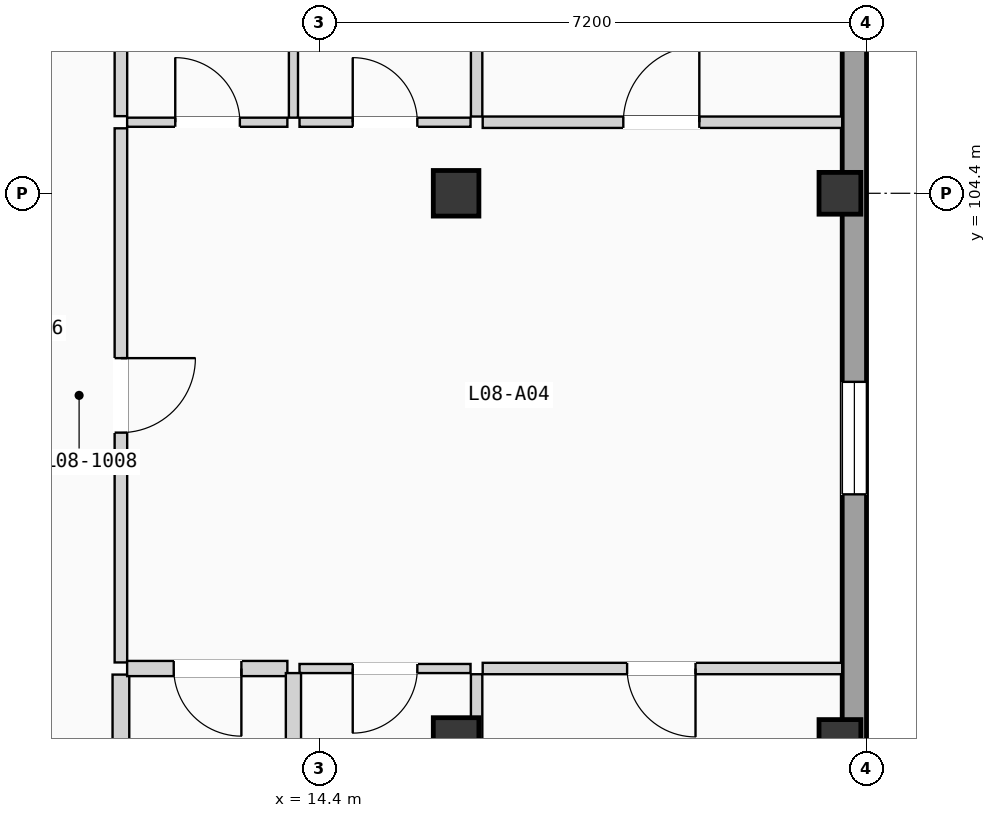
"""IFC4 building model, lengths in metres.
Left out: names, types, materials, properties, quantities, classifications, styles, units other than length and angle.
Written with IfcOpenShell. Run it as: python <this file> out.ifc"""

import sys

from ifc_helpers import new_model, si_unit, direction, frame, frame_2d, origin, origin_2d, place, context, subcontext, project, spatial, rectangle, extrude, element, fill, save


model = new_model("IFC4")
c1 = context("Model", 3, precision=1e-05, world=origin(), true_north=direction((0.0, 1.0)))
c2 = subcontext(c1, "Body", "Model", "MODEL_VIEW")
j1 = project(units=[si_unit("LENGTHUNIT", "METRE"), si_unit("PLANEANGLEUNIT", "RADIAN")], contexts=[c1])
p1 = place(None, origin())
s1 = spatial("IfcSite", under=j1, at=p1, CompositionType="ELEMENT")
p2 = place(p1, origin())
s2 = spatial("IfcBuilding", under=s1, at=p2, CompositionType="ELEMENT")
p3 = place(p2, frame((0.0, 0.0, 27.825)))
s3 = spatial("IfcBuildingStorey", under=s2, at=p3, CompositionType="ELEMENT", Elevation=27.825)
for number, where, z_axis, x_axis in (
    (1, (16.2, 97.2, 0.0), (0.0, 0.0, 1.0), (1.0, 0.0, 0.0)),
    (2, (16.2, 104.4, 0.0), (0.0, 0.0, 1.0), (1.0, 0.0, 0.0)),
):
    element("IfcColumn", number, at=place(p3, frame(where, z_axis=z_axis, x_axis=x_axis)), inside=s3, PredefinedType="COLUMN", context=c2, shape_type="SweptSolid", body=[
        extrude(rectangle(XDim=0.6, YDim=0.6, at=origin_2d()), origin(), (0.0, 0.0, 1.0), 3.15),
    ])
for number, where, z_axis, x_axis in (
    (3, (21.25, 97.2, 0.0), (0.0, 0.0, 1.0), (1.0, 0.0, 0.0)),
    (4, (21.25, 104.4, 0.0), (0.0, 0.0, 1.0), (1.0, 0.0, 0.0)),
):
    element("IfcColumn", number, at=place(p3, frame(where, z_axis=z_axis, x_axis=x_axis)), inside=s3, PredefinedType="COLUMN", context=c2, shape_type="SweptSolid", body=[
        extrude(rectangle(XDim=0.55, YDim=0.55, at=origin_2d()), origin(), (0.0, 0.0, 1.0), 3.15),
    ])
p4 = place(p3, frame((21.44, 68.72, 0.0), z_axis=(0.0, 0.0, 1.0), x_axis=(0.0, 1.0, 0.0)))
e5 = element("IfcWall", 5, at=p4, inside=s3, PredefinedType="SOLIDWALL", context=c2, shape_type="SweptSolid", body=[
    extrude(rectangle(XDim=49.76, YDim=0.32, at=frame_2d((24.88, 0.0))), origin(), (0.0, 0.0, 1.0), 2.89),
])
p5 = place(p4, frame((15.59, 0.0, 0.9)))
e6 = element("IfcOpeningElement", 6, at=p5, cuts=e5, PredefinedType="OPENING", context=c2, shape_type="SweptSolid", body=[
    extrude(rectangle(XDim=1.48, YDim=1.2, at=frame_2d((0.74, 0.6))), frame((0.0, 0.17, 0.0), z_axis=(0.0, -1.0, 0.0), x_axis=(1.0, 0.0, 0.0)), (0.0, 0.0, 1.0), 0.34),
])
p6 = place(p4, frame((8.996, 0.0, 0.855)))
e7 = element("IfcOpeningElement", 7, at=p6, cuts=e5, PredefinedType="OPENING", context=c2, shape_type="SweptSolid", body=[
    extrude(rectangle(XDim=1.48, YDim=1.35, at=frame_2d((0.74, 0.675))), frame((0.0, 0.17, 0.0), z_axis=(0.0, -1.0, 0.0), x_axis=(1.0, 0.0, 0.0)), (0.0, 0.0, 1.0), 0.34),
])
p7 = place(p4, frame((19.0, 0.0, 0.705)))
e8 = element("IfcOpeningElement", 8, at=p7, cuts=e5, PredefinedType="OPENING", context=c2, shape_type="SweptSolid", body=[
    extrude(rectangle(XDim=1.48, YDim=1.5, at=frame_2d((0.74, 0.75))), frame((0.0, 0.17, 0.0), z_axis=(0.0, -1.0, 0.0), x_axis=(1.0, 0.0, 0.0)), (0.0, 0.0, 1.0), 0.34),
])
p8 = place(p4, frame((31.719, 0.0, 0.555)))
e9 = element("IfcOpeningElement", 9, at=p8, cuts=e5, PredefinedType="OPENING", context=c2, shape_type="SweptSolid", body=[
    extrude(rectangle(XDim=1.48, YDim=1.65, at=frame_2d((0.74, 0.825))), frame((0.0, 0.17, 0.0), z_axis=(0.0, -1.0, 0.0), x_axis=(1.0, 0.0, 0.0)), (0.0, 0.0, 1.0), 0.34),
])
p9 = place(p4, frame((25.411, 0.0, 0.85)))
e10 = element("IfcOpeningElement", 10, at=p9, cuts=e5, PredefinedType="OPENING", context=c2, shape_type="SweptSolid", body=[
    extrude(rectangle(XDim=0.95, YDim=1.2, at=frame_2d((0.475, 0.6))), frame((0.0, 0.17, 0.0), z_axis=(0.0, -1.0, 0.0), x_axis=(1.0, 0.0, 0.0)), (0.0, 0.0, 1.0), 0.34),
])
p10 = place(p4, frame((38.788, 0.0, 0.9)))
e11 = element("IfcOpeningElement", 11, at=p10, cuts=e5, PredefinedType="OPENING", context=c2, shape_type="SweptSolid", body=[
    extrude(rectangle(XDim=1.6, YDim=1.2, at=frame_2d((0.8, 0.6))), frame((0.0, 0.17, 0.0), z_axis=(0.0, -1.0, 0.0), x_axis=(1.0, 0.0, 0.0)), (0.0, 0.0, 1.0), 0.34),
])
p11 = place(p3, frame((11.79, 98.227, 0.0), z_axis=(0.0, 0.0, 1.0), x_axis=(0.0, 1.0, 0.0)))
e12 = element("IfcWall", 12, at=p11, inside=s3, PredefinedType="PARTITIONING", context=c2, shape_type="SweptSolid", body=[
    extrude(rectangle(XDim=7.028, YDim=0.165, at=frame_2d((3.514, 0.0))), origin(), (0.0, 0.0, 1.0), 2.87),
])
p12 = place(p11, frame((3.024, 0.0, 0.0)))
e13 = element("IfcOpeningElement", 13, at=p12, cuts=e12, PredefinedType="OPENING", context=c2, shape_type="SweptSolid", body=[
    extrude(rectangle(XDim=0.98, YDim=2.08, at=frame_2d((0.49, 1.04))), frame((0.0, 0.093, 0.0), z_axis=(0.0, -1.0, 0.0), x_axis=(1.0, 0.0, 0.0)), (0.0, 0.0, 1.0), 0.185),
])
p13 = place(p3, frame((11.79, 92.282, 0.0), z_axis=(0.0, 0.0, 1.0), x_axis=(0.0, 1.0, 0.0)))
e14 = element("IfcWall", 14, at=p13, inside=s3, PredefinedType="PLUMBINGWALL", context=c2, shape_type="SweptSolid", body=[
    extrude(rectangle(XDim=5.785, YDim=0.22, at=frame_2d((2.893, 0.0))), origin(), (0.0, 0.0, 1.0), 2.87),
])
p14 = place(p3, frame((11.79, 105.415, 0.0), z_axis=(0.0, 0.0, 1.0), x_axis=(0.0, 1.0, 0.0)))
e15 = element("IfcWall", 15, at=p14, inside=s3, PredefinedType="PARTITIONING", context=c2, shape_type="SweptSolid", body=[
    extrude(rectangle(XDim=5.785, YDim=0.165, at=frame_2d((2.893, 0.0))), origin(), (0.0, 0.0, 1.0), 2.87),
])
p15 = place(p3, frame((11.872, 98.147, 0.0), z_axis=(0.0, 0.0, 1.0), x_axis=(1.0, 0.0, 0.0)))
e16 = element("IfcWall", 16, at=p15, inside=s3, PredefinedType="PLUMBINGWALL", context=c2, shape_type="SweptSolid", body=[
    extrude(rectangle(XDim=2.108, YDim=0.2, at=frame_2d((1.054, 0.0))), origin(), (0.0, 0.0, 1.0), 2.87),
])
p16 = place(p15, frame((0.613, 0.0, 0.0)))
e17 = element("IfcOpeningElement", 17, at=p16, cuts=e16, PredefinedType="OPENING", context=c2, shape_type="SweptSolid", body=[
    extrude(rectangle(XDim=0.89, YDim=2.03, at=frame_2d((0.445, 1.015))), frame((0.0, 0.11, 0.0), z_axis=(0.0, -1.0, 0.0), x_axis=(1.0, 0.0, 0.0)), (0.0, 0.0, 1.0), 0.22),
])
p17 = place(p3, frame((11.872, 105.335, 0.0), z_axis=(0.0, 0.0, 1.0), x_axis=(1.0, 0.0, 0.0)))
e18 = element("IfcWall", 18, at=p17, inside=s3, PredefinedType="PARTITIONING", context=c2, shape_type="SweptSolid", body=[
    extrude(rectangle(XDim=2.108, YDim=0.12, at=frame_2d((1.054, 0.0))), origin(), (0.0, 0.0, 1.0), 2.87),
])
p18 = place(p17, frame((0.633, 0.0, 0.0)))
e19 = element("IfcOpeningElement", 19, at=p18, cuts=e18, PredefinedType="OPENING", context=c2, shape_type="SweptSolid", body=[
    extrude(rectangle(XDim=0.85, YDim=2.01, at=frame_2d((0.425, 1.005))), frame((0.0, 0.07, 0.0), z_axis=(0.0, -1.0, 0.0), x_axis=(1.0, 0.0, 0.0)), (0.0, 0.0, 1.0), 0.14),
])
p19 = place(p3, frame((16.55, 98.147, 0.0), z_axis=(0.0, 0.0, 1.0), x_axis=(1.0, 0.0, 0.0)))
e20 = element("IfcWall", 20, at=p19, inside=s3, PredefinedType="PARTITIONING", context=c2, shape_type="SweptSolid", body=[
    extrude(rectangle(XDim=4.73, YDim=0.15, at=frame_2d((2.365, 0.0))), origin(), (0.0, 0.0, 1.0), 2.87),
])
p20 = place(p19, frame((1.9, 0.0, 0.0)))
e21 = element("IfcOpeningElement", 21, at=p20, cuts=e20, PredefinedType="OPENING", context=c2, shape_type="SweptSolid", body=[
    extrude(rectangle(XDim=0.9, YDim=2.04, at=frame_2d((0.45, 1.02))), frame((0.0, 0.085, 0.0), z_axis=(0.0, -1.0, 0.0), x_axis=(1.0, 0.0, 0.0)), (0.0, 0.0, 1.0), 0.17),
])
p21 = place(p3, frame((14.14, 98.147, 0.0), z_axis=(0.0, 0.0, 1.0), x_axis=(1.0, 0.0, 0.0)))
e22 = element("IfcWall", 22, at=p21, inside=s3, PredefinedType="PARTITIONING", context=c2, shape_type="SweptSolid", body=[
    extrude(rectangle(XDim=2.25, YDim=0.12, at=frame_2d((1.125, 0.0))), origin(), (0.0, 0.0, 1.0), 2.87),
])
p22 = place(p21, frame((0.7, 0.0, 0.0)))
e23 = element("IfcOpeningElement", 23, at=p22, cuts=e22, PredefinedType="OPENING", context=c2, shape_type="SweptSolid", body=[
    extrude(rectangle(XDim=0.85, YDim=2.01, at=frame_2d((0.425, 1.005))), frame((0.0, 0.07, 0.0), z_axis=(0.0, -1.0, 0.0), x_axis=(1.0, 0.0, 0.0)), (0.0, 0.0, 1.0), 0.14),
])
p23 = place(p3, frame((16.55, 105.335, 0.0), z_axis=(0.0, 0.0, 1.0), x_axis=(1.0, 0.0, 0.0)))
e24 = element("IfcWall", 24, at=p23, inside=s3, PredefinedType="PARTITIONING", context=c2, shape_type="SweptSolid", body=[
    extrude(rectangle(XDim=4.73, YDim=0.15, at=frame_2d((2.365, 0.0))), origin(), (0.0, 0.0, 1.0), 2.87),
])
p24 = place(p23, frame((1.85, 0.0, 0.0)))
e25 = element("IfcOpeningElement", 25, at=p24, cuts=e24, PredefinedType="OPENING", context=c2, shape_type="SweptSolid", body=[
    extrude(rectangle(XDim=1.0, YDim=2.06, at=frame_2d((0.5, 1.03))), frame((0.0, 0.085, 0.0), z_axis=(0.0, -1.0, 0.0), x_axis=(1.0, 0.0, 0.0)), (0.0, 0.0, 1.0), 0.17),
])
p25 = place(p3, frame((14.14, 105.335, 0.0), z_axis=(0.0, 0.0, 1.0), x_axis=(1.0, 0.0, 0.0)))
e26 = element("IfcWall", 26, at=p25, inside=s3, PredefinedType="PARTITIONING", context=c2, shape_type="SweptSolid", body=[
    extrude(rectangle(XDim=2.25, YDim=0.12, at=frame_2d((1.125, 0.0))), origin(), (0.0, 0.0, 1.0), 2.87),
])
p26 = place(p25, frame((0.7, 0.0, 0.0)))
e27 = element("IfcOpeningElement", 27, at=p26, cuts=e26, PredefinedType="OPENING", context=c2, shape_type="SweptSolid", body=[
    extrude(rectangle(XDim=0.85, YDim=2.01, at=frame_2d((0.425, 1.005))), frame((0.0, 0.07, 0.0), z_axis=(0.0, -1.0, 0.0), x_axis=(1.0, 0.0, 0.0)), (0.0, 0.0, 1.0), 0.14),
])
p27 = place(p3, frame((14.06, 92.282, 0.0), z_axis=(0.0, 0.0, 1.0), x_axis=(0.0, 1.0, 0.0)))
e28 = element("IfcWall", 28, at=p27, inside=s3, PredefinedType="PLUMBINGWALL", context=c2, shape_type="SweptSolid", body=[
    extrude(rectangle(XDim=5.805, YDim=0.2, at=frame_2d((2.902, 0.0))), origin(), (0.0, 0.0, 1.0), 2.87),
])
p28 = place(p27, frame((2.467, 0.0, 0.0)))
e29 = element("IfcOpeningElement", 29, at=p28, cuts=e28, PredefinedType="OPENING", context=c2, shape_type="SweptSolid", body=[
    extrude(rectangle(XDim=0.85, YDim=2.01, at=frame_2d((0.425, 1.005))), frame((0.0, 0.11, 0.0), z_axis=(0.0, -1.0, 0.0), x_axis=(1.0, 0.0, 0.0)), (0.0, 0.0, 1.0), 0.22),
])
p29 = place(p3, frame((14.06, 105.395, 0.0), z_axis=(0.0, 0.0, 1.0), x_axis=(0.0, 1.0, 0.0)))
e30 = element("IfcWall", 30, at=p29, inside=s3, PredefinedType="PARTITIONING", context=c2, shape_type="SweptSolid", body=[
    extrude(rectangle(XDim=5.805, YDim=0.12, at=frame_2d((2.902, 0.0))), origin(), (0.0, 0.0, 1.0), 2.87),
])
for number, where, z_axis, x_axis in (
    (31, (16.47, 92.282, 0.0), (0.0, 0.0, 1.0), (0.0, 1.0, 0.0)),
    (32, (16.47, 105.41, 0.0), (0.0, 0.0, 1.0), (0.0, 1.0, 0.0)),
):
    element("IfcWall", number, at=place(p3, frame(where, z_axis=z_axis, x_axis=x_axis)), inside=s3, PredefinedType="PARTITIONING", context=c2, shape_type="SweptSolid", body=[
        extrude(rectangle(XDim=5.79, YDim=0.15, at=frame_2d((2.895, 0.0))), origin(), (0.0, 0.0, 1.0), 2.87),
    ])
p30 = place(p8, origin())
e33 = element("IfcWindow", 33, at=p30, inside=s3, PartitioningType="SINGLE_PANEL", PredefinedType="WINDOW", context=c2, shape_type="SweptSolid", body=[
    extrude(rectangle(XDim=1.48, YDim=1.65, at=frame_2d((0.74, 0.825))), frame((0.0, 0.03, 0.0), z_axis=(0.0, -1.0, 0.0), x_axis=(1.0, 0.0, 0.0)), (0.0, 0.0, 1.0), 0.06),
])
fill(e9, e33)
p31 = place(p12, frame((0.98, 0.0, 0.0), z_axis=(0.0, 0.0, 1.0), x_axis=(-1.0, 0.0, 0.0)))
e34 = element("IfcDoor", 34, at=p31, inside=s3, OperationType="SINGLE_SWING_RIGHT", PredefinedType="DOOR", context=c2, shape_type="SweptSolid", body=[
    extrude(rectangle(XDim=0.98, YDim=2.08, at=frame_2d((0.49, 1.04))), frame((0.0, 0.025, 0.0), z_axis=(0.0, -1.0, 0.0), x_axis=(1.0, 0.0, 0.0)), (0.0, 0.0, 1.0), 0.05),
])
fill(e13, e34)
p32 = place(p16, frame((0.89, 0.0, 0.0), z_axis=(0.0, 0.0, 1.0), x_axis=(-1.0, 0.0, 0.0)))
e35 = element("IfcDoor", 35, at=p32, inside=s3, OperationType="SINGLE_SWING_RIGHT", PredefinedType="DOOR", context=c2, shape_type="SweptSolid", body=[
    extrude(rectangle(XDim=0.89, YDim=2.03, at=frame_2d((0.445, 1.015))), frame((0.0, 0.025, 0.0), z_axis=(0.0, -1.0, 0.0), x_axis=(1.0, 0.0, 0.0)), (0.0, 0.0, 1.0), 0.05),
])
fill(e17, e35)
p33 = place(p18, origin())
e36 = element("IfcDoor", 36, at=p33, inside=s3, OperationType="SINGLE_SWING_LEFT", PredefinedType="DOOR", context=c2, shape_type="SweptSolid", body=[
    extrude(rectangle(XDim=0.85, YDim=2.01, at=frame_2d((0.425, 1.005))), frame((0.0, 0.025, 0.0), z_axis=(0.0, -1.0, 0.0), x_axis=(1.0, 0.0, 0.0)), (0.0, 0.0, 1.0), 0.05),
])
fill(e19, e36)
p34 = place(p20, frame((0.9, 0.0, 0.0), z_axis=(0.0, 0.0, 1.0), x_axis=(-1.0, 0.0, 0.0)))
e37 = element("IfcDoor", 37, at=p34, inside=s3, OperationType="SINGLE_SWING_RIGHT", PredefinedType="DOOR", context=c2, shape_type="SweptSolid", body=[
    extrude(rectangle(XDim=0.9, YDim=2.04, at=frame_2d((0.45, 1.02))), frame((0.0, 0.025, 0.0), z_axis=(0.0, -1.0, 0.0), x_axis=(1.0, 0.0, 0.0)), (0.0, 0.0, 1.0), 0.05),
])
fill(e21, e37)
p35 = place(p22, frame((0.85, 0.0, 0.0), z_axis=(0.0, 0.0, 1.0), x_axis=(-1.0, 0.0, 0.0)))
e38 = element("IfcDoor", 38, at=p35, inside=s3, OperationType="SINGLE_SWING_LEFT", PredefinedType="DOOR", context=c2, shape_type="SweptSolid", body=[
    extrude(rectangle(XDim=0.85, YDim=2.01, at=frame_2d((0.425, 1.005))), frame((0.0, 0.025, 0.0), z_axis=(0.0, -1.0, 0.0), x_axis=(1.0, 0.0, 0.0)), (0.0, 0.0, 1.0), 0.05),
])
fill(e23, e38)
p36 = place(p24, origin())
e39 = element("IfcDoor", 39, at=p36, inside=s3, OperationType="SINGLE_SWING_RIGHT", PredefinedType="DOOR", context=c2, shape_type="SweptSolid", body=[
    extrude(rectangle(XDim=1.0, YDim=2.06, at=frame_2d((0.5, 1.03))), frame((0.0, 0.025, 0.0), z_axis=(0.0, -1.0, 0.0), x_axis=(1.0, 0.0, 0.0)), (0.0, 0.0, 1.0), 0.05),
])
fill(e25, e39)
p37 = place(p26, origin())
e40 = element("IfcDoor", 40, at=p37, inside=s3, OperationType="SINGLE_SWING_LEFT", PredefinedType="DOOR", context=c2, shape_type="SweptSolid", body=[
    extrude(rectangle(XDim=0.85, YDim=2.01, at=frame_2d((0.425, 1.005))), frame((0.0, 0.025, 0.0), z_axis=(0.0, -1.0, 0.0), x_axis=(1.0, 0.0, 0.0)), (0.0, 0.0, 1.0), 0.05),
])
fill(e27, e40)
save(model, sys.argv[1])
